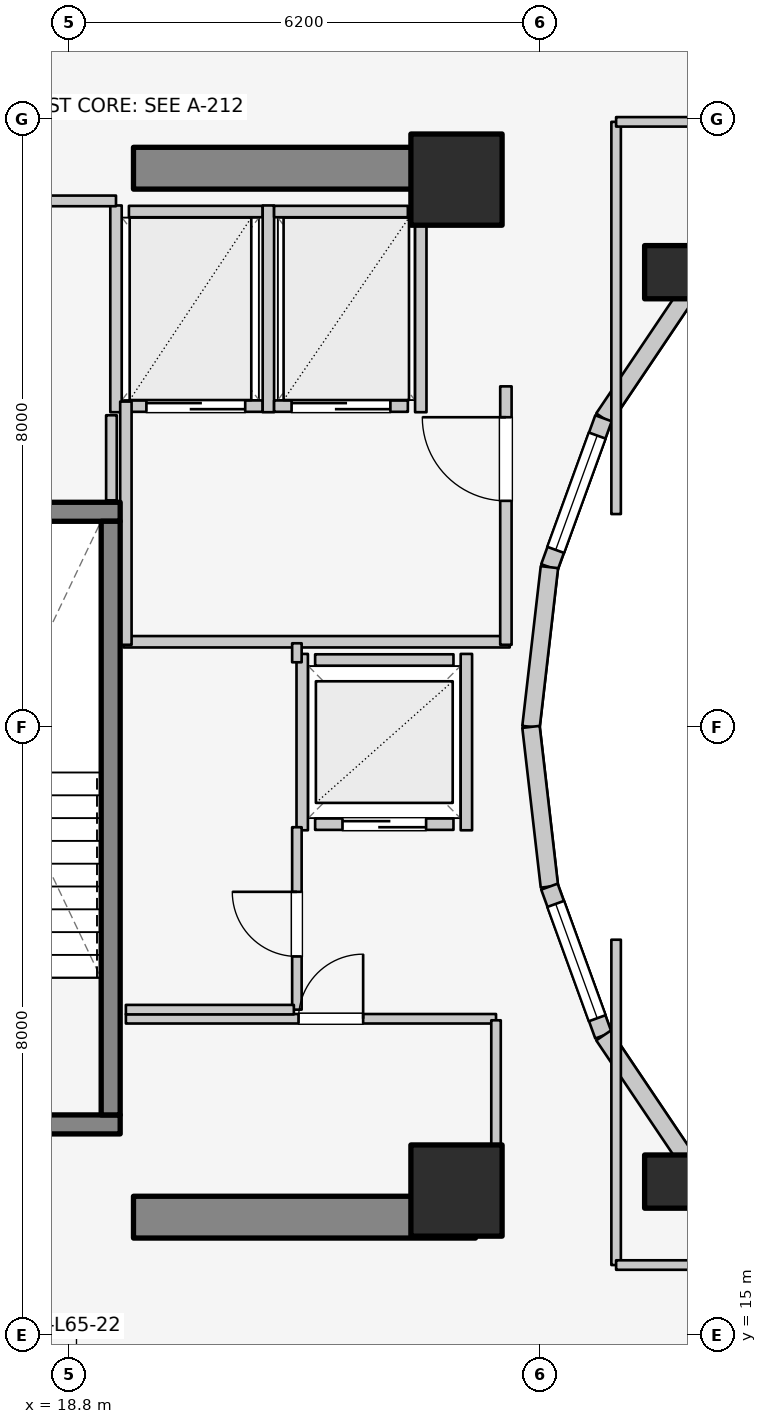
"""IFC4 building model, lengths in metres.
Left out: names, types, materials, properties, quantities, classifications, styles, units other than length and angle.
Written with IfcOpenShell. Run it as: python <this file> out.ifc"""

import sys

from ifc_helpers import new_model, si_unit, direction, frame, frame_2d, origin, origin_2d, place, context, subcontext, project, spatial, rectangle, extrude, element, fill, save


model = new_model("IFC4")
c1 = context("Model", 3, precision=1e-05, world=origin(), true_north=direction((0.0, 1.0)))
c2 = subcontext(c1, "Body", "Model", "MODEL_VIEW")
j1 = project(units=[si_unit("LENGTHUNIT", "METRE"), si_unit("PLANEANGLEUNIT", "RADIAN")], contexts=[c1])
p1 = place(None, origin())
s1 = spatial("IfcSite", under=j1, at=p1, CompositionType="ELEMENT")
p2 = place(p1, origin())
s2 = spatial("IfcBuilding", under=s1, at=p2, CompositionType="ELEMENT")
p3 = place(p2, frame((0.0, 0.0, 214.0)))
s3 = spatial("IfcBuildingStorey", under=s2, at=p3, CompositionType="ELEMENT", Elevation=214.0)
for number, where, z_axis, x_axis in (
    (1, (19.65, 16.55, 0.0), (0.0, 0.0, 1.0), (1.0, 0.0, 0.0)),
    (2, (19.65, 30.35, 0.0), (0.0, 0.0, 1.0), (1.0, 0.0, 0.0)),
):
    element("IfcWall", number, at=place(p3, frame(where, z_axis=z_axis, x_axis=x_axis)), inside=s3, PredefinedType="SHEAR", context=c2, shape_type="SweptSolid", body=[
        extrude(rectangle(XDim=4.5, YDim=0.55, at=frame_2d((2.25, 0.0))), origin(), (0.0, 0.0, 1.0), 3.1),
    ])
p4 = place(p3, frame((16.105, 17.77, 0.0), z_axis=(0.0, 0.0, 1.0), x_axis=(1.0, 0.0, 0.0)))
e3 = element("IfcWall", 3, at=p4, inside=s3, PredefinedType="SOLIDWALL", context=c2, shape_type="SweptSolid", body=[
    extrude(rectangle(XDim=3.37, YDim=0.25, at=frame_2d((1.685, 0.0))), origin(), (0.0, 0.0, 1.0), 3.1),
])
p5 = place(p4, frame((1.135, 0.0, 0.0)))
e4 = element("IfcOpeningElement", 4, at=p5, cuts=e3, PredefinedType="OPENING", context=c2, shape_type="SweptSolid", body=[
    extrude(rectangle(XDim=1.1, YDim=2.1, at=frame_2d((0.55, 1.05))), frame((0.0, 0.135, 0.0), z_axis=(0.0, -1.0, 0.0), x_axis=(1.0, 0.0, 0.0)), (0.0, 0.0, 1.0), 0.27),
])
p6 = place(p3, frame((16.105, 25.83, 0.0), z_axis=(0.0, 0.0, 1.0), x_axis=(1.0, 0.0, 0.0)))
e5 = element("IfcWall", 5, at=p6, inside=s3, PredefinedType="SOLIDWALL", context=c2, shape_type="SweptSolid", body=[
    extrude(rectangle(XDim=3.37, YDim=0.25, at=frame_2d((1.685, 0.0))), origin(), (0.0, 0.0, 1.0), 3.1),
])
p7 = place(p3, frame((19.35, 17.895, 0.0), z_axis=(0.0, 0.0, 1.0), x_axis=(0.0, 1.0, 0.0)))
e6 = element("IfcWall", 6, at=p7, inside=s3, PredefinedType="SOLIDWALL", context=c2, shape_type="SweptSolid", body=[
    extrude(rectangle(XDim=7.81, YDim=0.25, at=frame_2d((3.905, 0.0))), origin(), (0.0, 0.0, 1.0), 3.1),
])
for number, where, z_axis, x_axis in (
    (7, (23.9, 16.9, 0.0), (0.0, 0.0, 1.0), (1.0, 0.0, 0.0)),
    (8, (23.9, 30.2, 0.0), (0.0, 0.0, 1.0), (1.0, 0.0, 0.0)),
):
    element("IfcColumn", number, at=place(p3, frame(where, z_axis=z_axis, x_axis=x_axis)), inside=s3, PredefinedType="COLUMN", context=c2, shape_type="SweptSolid", body=[
        extrude(rectangle(XDim=1.2, YDim=1.2, at=origin_2d()), origin(), (0.0, 0.0, 1.0), 3.1),
    ])
for number, where, z_axis, x_axis in (
    (9, (26.725, 28.982, 0.0), (0.0, 0.0, 1.0), (1.0, 0.0, 0.0)),
    (10, (26.725, 17.018, 0.0), (0.0, 0.0, 1.0), (1.0, 0.0, 0.0)),
):
    element("IfcColumn", number, at=place(p3, frame(where, z_axis=z_axis, x_axis=x_axis)), inside=s3, PredefinedType="COLUMN", context=c2, shape_type="SweptSolid", body=[
        extrude(rectangle(XDim=0.7, YDim=0.7, at=origin_2d()), origin(), (0.0, 0.0, 1.0), 3.1),
    ])
p8 = place(p3, frame((28.44, 30.032, 0.0), z_axis=(0.0, 0.0, 1.0), x_axis=(-0.752576694707, -0.658504607869, 0.0)))
e11 = element("IfcWall", 11, at=p8, inside=s3, PredefinedType="STANDARD", context=c2, shape_type="SweptSolid", body=[
    extrude(rectangle(XDim=1.959, YDim=0.23, at=frame_2d((0.98, 0.0))), origin(), (0.0, 0.0, 1.0), 2.16),
])
p9 = place(p3, frame((26.965, 28.742, 0.0), z_axis=(0.0, 0.0, 1.0), x_axis=(-0.558197800898, -0.829707909492, 0.0)))
e12 = element("IfcWall", 12, at=p9, inside=s3, PredefinedType="STANDARD", context=c2, shape_type="SweptSolid", body=[
    extrude(rectangle(XDim=2.027, YDim=0.23, at=frame_2d((1.013, 0.0))), origin(), (0.0, 0.0, 1.0), 2.16),
])
p10 = place(p3, frame((25.834, 27.06, 0.0), z_axis=(0.0, 0.0, 1.0), x_axis=(-0.341423187295, -0.93990968033, 0.0)))
e13 = element("IfcWall", 13, at=p10, inside=s3, PredefinedType="STANDARD", context=c2, shape_type="SweptSolid", body=[
    extrude(rectangle(XDim=2.084, YDim=0.23, at=frame_2d((1.042, 0.0))), origin(), (0.0, 0.0, 1.0), 2.84),
])
p11 = place(p10, frame((0.242, 0.0, 0.85)))
e14 = element("IfcOpeningElement", 14, at=p11, cuts=e13, PredefinedType="OPENING", context=c2, shape_type="SweptSolid", body=[
    extrude(rectangle(XDim=1.6, YDim=1.65, at=frame_2d((0.8, 0.825))), frame((0.0, 0.125, 0.0), z_axis=(0.0, -1.0, 0.0), x_axis=(1.0, 0.0, 0.0)), (0.0, 0.0, 1.0), 0.25),
])
for number, where, z_axis, x_axis in (
    (15, (25.123, 25.102, 0.0), (0.0, 0.0, 1.0), (-0.115, -0.993, 0.0)),
    (16, (24.88, 23.0, 0.0), (0.0, 0.0, 1.0), (0.115, -0.993, 0.0)),
):
    element("IfcWall", number, at=place(p3, frame(where, z_axis=z_axis, x_axis=x_axis)), inside=s3, PredefinedType="STANDARD", context=c2, shape_type="SweptSolid", body=[
        extrude(rectangle(XDim=2.115, YDim=0.23, at=frame_2d((1.058, 0.0))), origin(), (0.0, 0.0, 1.0), 2.84),
    ])
p12 = place(p3, frame((25.123, 20.898, 0.0), z_axis=(0.0, 0.0, 1.0), x_axis=(0.341423187295, -0.93990968033, 0.0)))
e17 = element("IfcWall", 17, at=p12, inside=s3, PredefinedType="STANDARD", context=c2, shape_type="SweptSolid", body=[
    extrude(rectangle(XDim=2.084, YDim=0.23, at=frame_2d((1.042, 0.0))), origin(), (0.0, 0.0, 1.0), 2.84),
])
p13 = place(p12, frame((0.242, 0.0, 0.85)))
e18 = element("IfcOpeningElement", 18, at=p13, cuts=e17, PredefinedType="OPENING", context=c2, shape_type="SweptSolid", body=[
    extrude(rectangle(XDim=1.6, YDim=1.65, at=frame_2d((0.8, 0.825))), frame((0.0, 0.125, 0.0), z_axis=(0.0, -1.0, 0.0), x_axis=(1.0, 0.0, 0.0)), (0.0, 0.0, 1.0), 0.25),
])
p14 = place(p3, frame((25.834, 18.94, 0.0), z_axis=(0.0, 0.0, 1.0), x_axis=(0.558197800898, -0.829707909492, 0.0)))
e19 = element("IfcWall", 19, at=p14, inside=s3, PredefinedType="STANDARD", context=c2, shape_type="SweptSolid", body=[
    extrude(rectangle(XDim=2.027, YDim=0.23, at=frame_2d((1.013, 0.0))), origin(), (0.0, 0.0, 1.0), 2.16),
])
p15 = place(p3, frame((26.965, 17.258, 0.0), z_axis=(0.0, 0.0, 1.0), x_axis=(0.752576694707, -0.658504607869, 0.0)))
e20 = element("IfcWall", 20, at=p15, inside=s3, PredefinedType="STANDARD", context=c2, shape_type="SweptSolid", body=[
    extrude(rectangle(XDim=1.959, YDim=0.23, at=frame_2d((0.98, 0.0))), origin(), (0.0, 0.0, 1.0), 2.16),
])
p16 = place(p3, frame((22.04, 21.72, 0.0), z_axis=(0.0, 0.0, 1.0), x_axis=(1.0, 0.0, 0.0)))
e21 = element("IfcWall", 21, at=p16, inside=s3, PredefinedType="SOLIDWALL", context=c2, shape_type="SweptSolid", body=[
    extrude(rectangle(XDim=1.82, YDim=0.15, at=frame_2d((0.91, 0.0))), origin(), (0.0, 0.0, 1.0), 2.12),
])
p17 = place(p16, frame((0.36, 0.0, 0.0)))
e22 = element("IfcOpeningElement", 22, at=p17, cuts=e21, PredefinedType="OPENING", context=c2, shape_type="SweptSolid", body=[
    extrude(rectangle(XDim=1.1, YDim=2.1, at=frame_2d((0.55, 1.05))), frame((0.0, 0.085, 0.0), z_axis=(0.0, -1.0, 0.0), x_axis=(1.0, 0.0, 0.0)), (0.0, 0.0, 1.0), 0.17),
])
p18 = place(p3, frame((22.04, 23.88, 0.0), z_axis=(0.0, 0.0, 1.0), x_axis=(1.0, 0.0, 0.0)))
e23 = element("IfcWall", 23, at=p18, inside=s3, PredefinedType="SOLIDWALL", context=c2, shape_type="SweptSolid", body=[
    extrude(rectangle(XDim=1.82, YDim=0.15, at=frame_2d((0.91, 0.0))), origin(), (0.0, 0.0, 1.0), 2.12),
])
p19 = place(p3, frame((21.87, 21.64, 0.0), z_axis=(0.0, 0.0, 1.0), x_axis=(0.0, 1.0, 0.0)))
e24 = element("IfcWall", 24, at=p19, inside=s3, PredefinedType="SOLIDWALL", context=c2, shape_type="SweptSolid", body=[
    extrude(rectangle(XDim=2.32, YDim=0.15, at=frame_2d((1.16, 0.0))), origin(), (0.0, 0.0, 1.0), 2.855),
])
p20 = place(p3, frame((24.03, 21.64, 0.0), z_axis=(0.0, 0.0, 1.0), x_axis=(0.0, 1.0, 0.0)))
e25 = element("IfcWall", 25, at=p20, inside=s3, PredefinedType="SOLIDWALL", context=c2, shape_type="SweptSolid", body=[
    extrude(rectangle(XDim=2.32, YDim=0.15, at=frame_2d((1.16, 0.0))), origin(), (0.0, 0.0, 1.0), 2.12),
])
p21 = place(p3, frame((19.59, 27.22, 0.0), z_axis=(0.0, 0.0, 1.0), x_axis=(1.0, 0.0, 0.0)))
e26 = element("IfcWall", 26, at=p21, inside=s3, PredefinedType="SOLIDWALL", context=c2, shape_type="SweptSolid", body=[
    extrude(rectangle(XDim=1.76, YDim=0.15, at=frame_2d((0.88, 0.0))), origin(), (0.0, 0.0, 1.0), 2.855),
])
p22 = place(p21, frame((0.23, 0.0, 0.0)))
e27 = element("IfcOpeningElement", 27, at=p22, cuts=e26, PredefinedType="OPENING", context=c2, shape_type="SweptSolid", body=[
    extrude(rectangle(XDim=1.3, YDim=2.1, at=frame_2d((0.65, 1.05))), frame((0.0, 0.085, 0.0), z_axis=(0.0, -1.0, 0.0), x_axis=(1.0, 0.0, 0.0)), (0.0, 0.0, 1.0), 0.17),
])
p23 = place(p3, frame((19.59, 29.78, 0.0), z_axis=(0.0, 0.0, 1.0), x_axis=(1.0, 0.0, 0.0)))
e28 = element("IfcWall", 28, at=p23, inside=s3, PredefinedType="SOLIDWALL", context=c2, shape_type="SweptSolid", body=[
    extrude(rectangle(XDim=1.76, YDim=0.15, at=frame_2d((0.88, 0.0))), origin(), (0.0, 0.0, 1.0), 2.855),
])
for number, where, z_axis, x_axis in (
    (29, (19.42, 27.14, 0.0), (0.0, 0.0, 1.0), (0.0, 1.0, 0.0)),
    (30, (21.425, 27.14, 0.0), (0.0, 0.0, 1.0), (0.0, 1.0, 0.0)),
):
    element("IfcWall", number, at=place(p3, frame(where, z_axis=z_axis, x_axis=x_axis)), inside=s3, PredefinedType="SOLIDWALL", context=c2, shape_type="SweptSolid", body=[
        extrude(rectangle(XDim=2.72, YDim=0.15, at=frame_2d((1.36, 0.0))), origin(), (0.0, 0.0, 1.0), 2.855),
    ])
p24 = place(p3, frame((21.5, 27.22, 0.0), z_axis=(0.0, 0.0, 1.0), x_axis=(1.0, 0.0, 0.0)))
e31 = element("IfcWall", 31, at=p24, inside=s3, PredefinedType="SOLIDWALL", context=c2, shape_type="SweptSolid", body=[
    extrude(rectangle(XDim=1.76, YDim=0.15, at=frame_2d((0.88, 0.0))), origin(), (0.0, 0.0, 1.0), 2.855),
])
p25 = place(p24, frame((0.23, 0.0, 0.0)))
e32 = element("IfcOpeningElement", 32, at=p25, cuts=e31, PredefinedType="OPENING", context=c2, shape_type="SweptSolid", body=[
    extrude(rectangle(XDim=1.3, YDim=2.1, at=frame_2d((0.65, 1.05))), frame((0.0, 0.085, 0.0), z_axis=(0.0, -1.0, 0.0), x_axis=(1.0, 0.0, 0.0)), (0.0, 0.0, 1.0), 0.17),
])
p26 = place(p3, frame((21.5, 29.78, 0.0), z_axis=(0.0, 0.0, 1.0), x_axis=(1.0, 0.0, 0.0)))
e33 = element("IfcWall", 33, at=p26, inside=s3, PredefinedType="SOLIDWALL", context=c2, shape_type="SweptSolid", body=[
    extrude(rectangle(XDim=1.76, YDim=0.15, at=frame_2d((0.88, 0.0))), origin(), (0.0, 0.0, 1.0), 2.855),
])
p27 = place(p3, frame((23.43, 27.14, 0.0), z_axis=(0.0, 0.0, 1.0), x_axis=(0.0, 1.0, 0.0)))
e34 = element("IfcWall", 34, at=p27, inside=s3, PredefinedType="SOLIDWALL", context=c2, shape_type="SweptSolid", body=[
    extrude(rectangle(XDim=2.72, YDim=0.15, at=frame_2d((1.36, 0.0))), origin(), (0.0, 0.0, 1.0), 2.855),
])
p28 = place(p3, frame((19.52, 24.12, 0.0), z_axis=(0.0, 0.0, 1.0), x_axis=(1.0, 0.0, 0.0)))
e35 = element("IfcWall", 35, at=p28, inside=s3, PredefinedType="PARTITIONING", context=c2, shape_type="SweptSolid", body=[
    extrude(rectangle(XDim=5.08, YDim=0.15, at=frame_2d((2.54, 0.0))), origin(), (0.0, 0.0, 1.0), 2.12),
])
p29 = place(p3, frame((19.55, 24.08, 0.0), z_axis=(0.0, 0.0, 1.0), x_axis=(0.0, 1.0, 0.0)))
e36 = element("IfcWall", 36, at=p29, inside=s3, PredefinedType="PARTITIONING", context=c2, shape_type="SweptSolid", body=[
    extrude(rectangle(XDim=3.2, YDim=0.15, at=frame_2d((1.6, 0.0))), origin(), (0.0, 0.0, 1.0), 2.855),
])
p30 = place(p3, frame((24.55, 24.08, 0.0), z_axis=(0.0, 0.0, 1.0), x_axis=(0.0, 1.0, 0.0)))
e37 = element("IfcWall", 37, at=p30, inside=s3, PredefinedType="PARTITIONING", context=c2, shape_type="SweptSolid", body=[
    extrude(rectangle(XDim=3.4, YDim=0.15, at=frame_2d((1.7, 0.0))), origin(), (0.0, 0.0, 1.0), 2.855),
])
p31 = place(p30, frame((1.894, 0.0, 0.0)))
e38 = element("IfcOpeningElement", 38, at=p31, cuts=e37, PredefinedType="OPENING", context=c2, shape_type="SweptSolid", body=[
    extrude(rectangle(XDim=1.1, YDim=2.1, at=frame_2d((0.55, 1.05))), frame((0.0, 0.085, 0.0), z_axis=(0.0, -1.0, 0.0), x_axis=(1.0, 0.0, 0.0)), (0.0, 0.0, 1.0), 0.17),
])
p32 = place(p3, frame((19.55, 19.16, 0.0), z_axis=(0.0, 0.0, 1.0), x_axis=(1.0, 0.0, 0.0)))
e39 = element("IfcWall", 39, at=p32, inside=s3, PredefinedType="PARTITIONING", context=c2, shape_type="SweptSolid", body=[
    extrude(rectangle(XDim=4.87, YDim=0.125, at=frame_2d((2.435, 0.0))), origin(), (0.0, 0.0, 1.0), 2.12),
])
p33 = place(p32, frame((2.272, 0.0, 0.0)))
e40 = element("IfcOpeningElement", 40, at=p33, cuts=e39, PredefinedType="OPENING", context=c2, shape_type="SweptSolid", body=[
    extrude(rectangle(XDim=0.85, YDim=2.05, at=frame_2d((0.425, 1.025))), frame((0.0, 0.073, 0.0), z_axis=(0.0, -1.0, 0.0), x_axis=(1.0, 0.0, 0.0)), (0.0, 0.0, 1.0), 0.145),
])
p34 = place(p3, frame((24.42, 17.1, 0.0), z_axis=(0.0, 0.0, 1.0), x_axis=(0.0, 1.0, 0.0)))
e41 = element("IfcWall", 41, at=p34, inside=s3, PredefinedType="PARTITIONING", context=c2, shape_type="SweptSolid", body=[
    extrude(rectangle(XDim=2.04, YDim=0.125, at=frame_2d((1.02, 0.0))), origin(), (0.0, 0.0, 1.0), 2.232),
])
p35 = place(p3, frame((21.8, 19.28, 0.0), z_axis=(0.0, 0.0, 1.0), x_axis=(0.0, 1.0, 0.0)))
e42 = element("IfcWall", 42, at=p35, inside=s3, PredefinedType="PARTITIONING", context=c2, shape_type="SweptSolid", body=[
    extrude(rectangle(XDim=2.4, YDim=0.125, at=frame_2d((1.2, 0.0))), origin(), (0.0, 0.0, 1.0), 2.855),
])
p36 = place(p35, frame((0.7, 0.0, 0.0)))
e43 = element("IfcOpeningElement", 43, at=p36, cuts=e42, PredefinedType="OPENING", context=c2, shape_type="SweptSolid", body=[
    extrude(rectangle(XDim=0.85, YDim=2.05, at=frame_2d((0.425, 1.025))), frame((0.0, 0.073, 0.0), z_axis=(0.0, -1.0, 0.0), x_axis=(1.0, 0.0, 0.0)), (0.0, 0.0, 1.0), 0.145),
])
p37 = place(p3, frame((21.8, 23.85, 0.0), z_axis=(0.0, 0.0, 1.0), x_axis=(0.0, 1.0, 0.0)))
e44 = element("IfcWall", 44, at=p37, inside=s3, PredefinedType="PARTITIONING", context=c2, shape_type="SweptSolid", body=[
    extrude(rectangle(XDim=0.25, YDim=0.125, at=frame_2d((0.125, 0.0))), origin(), (0.0, 0.0, 1.0), 2.855),
])
p38 = place(p3, frame((19.55, 19.28, 0.0), z_axis=(0.0, 0.0, 1.0), x_axis=(1.0, 0.0, 0.0)))
e45 = element("IfcWall", 45, at=p38, inside=s3, PredefinedType="PARTITIONING", context=c2, shape_type="SweptSolid", body=[
    extrude(rectangle(XDim=2.21, YDim=0.125, at=frame_2d((1.105, 0.0))), origin(), (0.0, 0.0, 1.0), 2.12),
])
p39 = place(p3, frame((16.12, 29.92, 0.0), z_axis=(0.0, 0.0, 1.0), x_axis=(1.0, 0.0, 0.0)))
e46 = element("IfcWall", 46, at=p39, inside=s3, PredefinedType="PLUMBINGWALL", context=c2, shape_type="SweptSolid", body=[
    extrude(rectangle(XDim=3.3, YDim=0.14, at=frame_2d((1.65, 0.0))), origin(), (0.0, 0.0, 1.0), 2.855),
])
p40 = place(p39, frame((1.399, 0.0, 0.0)))
e47 = element("IfcOpeningElement", 47, at=p40, cuts=e46, PredefinedType="OPENING", context=c2, shape_type="SweptSolid", body=[
    extrude(rectangle(XDim=0.85, YDim=2.05, at=frame_2d((0.425, 1.025))), frame((0.0, 0.08, 0.0), z_axis=(0.0, -1.0, 0.0), x_axis=(1.0, 0.0, 0.0)), (0.0, 0.0, 1.0), 0.16),
])
p41 = place(p3, frame((19.36, 25.98, 0.0), z_axis=(0.0, 0.0, 1.0), x_axis=(0.0, 1.0, 0.0)))
e48 = element("IfcWall", 48, at=p41, inside=s3, PredefinedType="PLUMBINGWALL", context=c2, shape_type="SweptSolid", body=[
    extrude(rectangle(XDim=1.12, YDim=0.14, at=frame_2d((0.56, 0.0))), origin(), (0.0, 0.0, 1.0), 2.855),
])
p42 = place(p3, frame((28.45, 30.015, 0.0), z_axis=(0.0, 0.0, 1.0), x_axis=(-0.522763432117, 0.852477796802, 0.0)))
e49 = element("IfcWall", 49, at=p42, inside=s3, PredefinedType="PARTITIONING", context=c2, shape_type="SweptSolid", body=[
    extrude(rectangle(XDim=3.269, YDim=0.125, at=frame_2d((1.635, 0.0))), origin(), (0.0, 0.0, 1.0), 2.376),
])
p43 = place(p3, frame((28.45, 15.985, 0.0), z_axis=(0.0, 0.0, 1.0), x_axis=(-0.52592395012, -0.850531597702, 0.0)))
e50 = element("IfcWall", 50, at=p43, inside=s3, PredefinedType="PARTITIONING", context=c2, shape_type="SweptSolid", body=[
    extrude(rectangle(XDim=2.869, YDim=0.125, at=frame_2d((1.435, 0.0))), origin(), (0.0, 0.0, 1.0), 2.376),
])
p44 = place(p3, frame((26.0, 25.8, 0.0), z_axis=(0.0, 0.0, 1.0), x_axis=(0.0, 1.0, 0.0)))
e51 = element("IfcWall", 51, at=p44, inside=s3, PredefinedType="PARTITIONING", context=c2, shape_type="SweptSolid", body=[
    extrude(rectangle(XDim=5.16, YDim=0.125, at=frame_2d((2.58, 0.0))), origin(), (0.0, 0.0, 1.0), 2.232),
])
p45 = place(p3, frame((26.0, 30.96, 0.0), z_axis=(0.0, 0.0, 1.0), x_axis=(1.0, 0.0, 0.0)))
e52 = element("IfcWall", 52, at=p45, inside=s3, PredefinedType="PARTITIONING", context=c2, shape_type="SweptSolid", body=[
    extrude(rectangle(XDim=2.6, YDim=0.125, at=frame_2d((1.3, 0.0))), origin(), (0.0, 0.0, 1.0), 2.376),
])
p46 = place(p3, frame((26.0, 15.92, 0.0), z_axis=(0.0, 0.0, 1.0), x_axis=(0.0, 1.0, 0.0)))
e53 = element("IfcWall", 53, at=p46, inside=s3, PredefinedType="PARTITIONING", context=c2, shape_type="SweptSolid", body=[
    extrude(rectangle(XDim=4.28, YDim=0.125, at=frame_2d((2.14, 0.0))), origin(), (0.0, 0.0, 1.0), 2.232),
])
p47 = place(p3, frame((26.0, 15.92, 0.0), z_axis=(0.0, 0.0, 1.0), x_axis=(1.0, 0.0, 0.0)))
e54 = element("IfcWall", 54, at=p47, inside=s3, PredefinedType="PARTITIONING", context=c2, shape_type="SweptSolid", body=[
    extrude(rectangle(XDim=2.6, YDim=0.125, at=frame_2d((1.3, 0.0))), origin(), (0.0, 0.0, 1.0), 2.232),
])
p48 = place(p11, origin())
e55 = element("IfcWindow", 55, at=p48, inside=s3, PartitioningType="SINGLE_PANEL", PredefinedType="WINDOW", context=c2, shape_type="SweptSolid", body=[
    extrude(rectangle(XDim=1.6, YDim=1.65, at=frame_2d((0.8, 0.825))), frame((0.0, 0.03, 0.0), z_axis=(0.0, -1.0, 0.0), x_axis=(1.0, 0.0, 0.0)), (0.0, 0.0, 1.0), 0.06),
])
fill(e14, e55)
p49 = place(p13, origin())
e56 = element("IfcWindow", 56, at=p49, inside=s3, PartitioningType="SINGLE_PANEL", PredefinedType="WINDOW", context=c2, shape_type="SweptSolid", body=[
    extrude(rectangle(XDim=1.6, YDim=1.65, at=frame_2d((0.8, 0.825))), frame((0.0, 0.03, 0.0), z_axis=(0.0, -1.0, 0.0), x_axis=(1.0, 0.0, 0.0)), (0.0, 0.0, 1.0), 0.06),
])
fill(e18, e56)
p50 = place(p17, origin())
e57 = element("IfcDoor", 57, at=p50, inside=s3, OperationType="DOUBLE_DOOR_SLIDING", PredefinedType="DOOR", context=c2, shape_type="SweptSolid", body=[
    extrude(rectangle(XDim=1.1, YDim=2.1, at=frame_2d((0.55, 1.05))), frame((0.0, 0.025, 0.0), z_axis=(0.0, -1.0, 0.0), x_axis=(1.0, 0.0, 0.0)), (0.0, 0.0, 1.0), 0.05),
])
fill(e22, e57)
p51 = place(p22, origin())
e58 = element("IfcDoor", 58, at=p51, inside=s3, OperationType="DOUBLE_DOOR_SLIDING", PredefinedType="DOOR", context=c2, shape_type="SweptSolid", body=[
    extrude(rectangle(XDim=1.3, YDim=2.1, at=frame_2d((0.65, 1.05))), frame((0.0, 0.025, 0.0), z_axis=(0.0, -1.0, 0.0), x_axis=(1.0, 0.0, 0.0)), (0.0, 0.0, 1.0), 0.05),
])
fill(e27, e58)
p52 = place(p25, origin())
e59 = element("IfcDoor", 59, at=p52, inside=s3, OperationType="DOUBLE_DOOR_SLIDING", PredefinedType="DOOR", context=c2, shape_type="SweptSolid", body=[
    extrude(rectangle(XDim=1.3, YDim=2.1, at=frame_2d((0.65, 1.05))), frame((0.0, 0.025, 0.0), z_axis=(0.0, -1.0, 0.0), x_axis=(1.0, 0.0, 0.0)), (0.0, 0.0, 1.0), 0.05),
])
fill(e32, e59)
p53 = place(p31, origin())
e60 = element("IfcDoor", 60, at=p53, inside=s3, OperationType="SINGLE_SWING_RIGHT", PredefinedType="DOOR", context=c2, shape_type="SweptSolid", body=[
    extrude(rectangle(XDim=1.1, YDim=2.1, at=frame_2d((0.55, 1.05))), frame((0.0, 0.025, 0.0), z_axis=(0.0, -1.0, 0.0), x_axis=(1.0, 0.0, 0.0)), (0.0, 0.0, 1.0), 0.05),
])
fill(e38, e60)
p54 = place(p33, origin())
e61 = element("IfcDoor", 61, at=p54, inside=s3, OperationType="SINGLE_SWING_RIGHT", PredefinedType="DOOR", context=c2, shape_type="SweptSolid", body=[
    extrude(rectangle(XDim=0.85, YDim=2.05, at=frame_2d((0.425, 1.025))), frame((0.0, 0.025, 0.0), z_axis=(0.0, -1.0, 0.0), x_axis=(1.0, 0.0, 0.0)), (0.0, 0.0, 1.0), 0.05),
])
fill(e40, e61)
p55 = place(p36, origin())
e62 = element("IfcDoor", 62, at=p55, inside=s3, OperationType="SINGLE_SWING_RIGHT", PredefinedType="DOOR", context=c2, shape_type="SweptSolid", body=[
    extrude(rectangle(XDim=0.85, YDim=2.05, at=frame_2d((0.425, 1.025))), frame((0.0, 0.025, 0.0), z_axis=(0.0, -1.0, 0.0), x_axis=(1.0, 0.0, 0.0)), (0.0, 0.0, 1.0), 0.05),
])
fill(e43, e62)
save(model, sys.argv[1])
